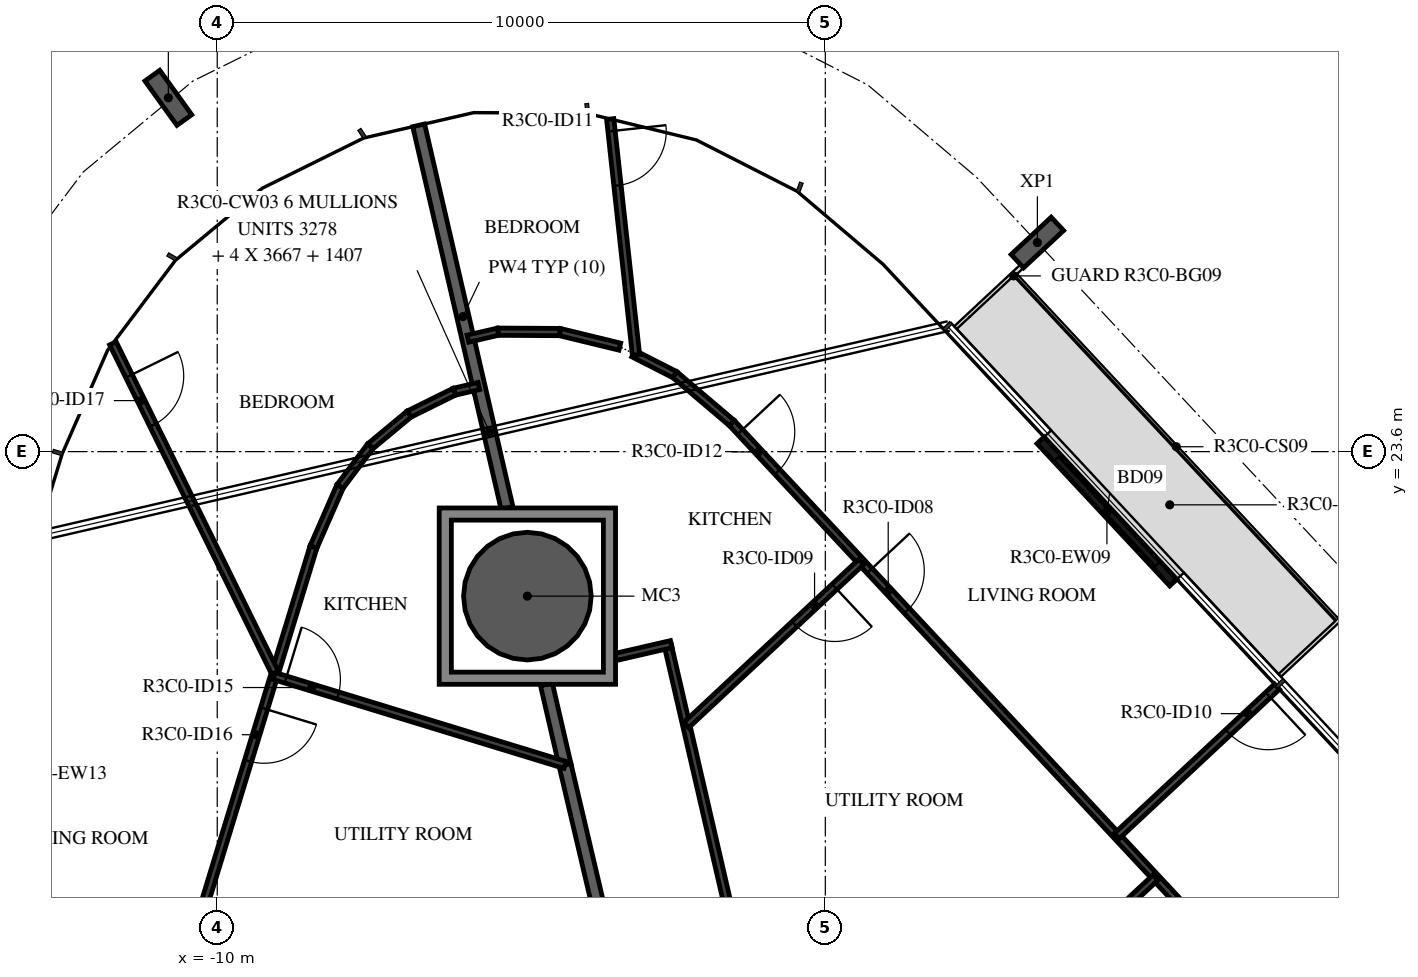
"""IFC4 building model, lengths in metres.
Left out: names, types, materials, properties, quantities, classifications, styles, units other than length and angle.
Written with IfcOpenShell. Run it as: python <this file> out.ifc"""

import sys

from ifc_helpers import new_model, si_unit, direction, frame, frame_2d, origin, origin_2d, place, context, subcontext, project, spatial, polyline, rectangle, hollow_circle, i_section, outline, extrude, element, fill, save


model = new_model("IFC4")
c1 = context("Model", 3, precision=1e-05, world=origin(), true_north=direction((0.0, 1.0)))
c2 = subcontext(c1, "Body", "Model", "MODEL_VIEW")
j1 = project(units=[si_unit("LENGTHUNIT", "METRE"), si_unit("PLANEANGLEUNIT", "RADIAN")], contexts=[c1])
p1 = place(None, origin())
s1 = spatial("IfcSite", under=j1, at=p1, CompositionType="ELEMENT")
p2 = place(p1, origin())
s2 = spatial("IfcBuilding", under=s1, at=p2, CompositionType="ELEMENT")
p3 = place(p2, frame((0.0, 0.0, 134.4)))
s3 = spatial("IfcBuildingStorey", under=s2, at=p3, CompositionType="ELEMENT", Elevation=134.4)
p4 = place(p3, frame((-4.9, 21.223, -0.38), z_axis=(0.0, 0.0, 1.0), x_axis=(1.0, 0.0, 0.0)))
e1 = element("IfcColumn", 1, at=p4, inside=s3, PredefinedType="COLUMN", context=c2, shape_type="SweptSolid", body=[
    extrude(hollow_circle(Radius=1.05, WallThickness=0.05, at=origin_2d()), origin(), (0.0, 0.0, 1.0), 3.5),
])
for number, where, z_axis, x_axis in (
    (2, (3.487, 27.039, -0.38), (0.0, 0.0, 1.0), (0.682, -0.731, 0.0)),
    (3, (-10.804, 29.418, -0.38), (0.0, 0.0, 1.0), (0.811, 0.585, 0.0)),
):
    element("IfcColumn", number, at=place(p3, frame(where, z_axis=z_axis, x_axis=x_axis)), inside=s3, PredefinedType="COLUMN", context=c2, shape_type="SweptSolid", body=[
        extrude(i_section(OverallWidth=0.3, OverallDepth=0.9, WebThickness=0.019, FlangeThickness=0.035, FilletRadius=0.03, at=origin_2d()), origin(), (0.0, 0.0, 1.0), 3.5),
    ])
p5 = place(p3, frame((5.722, 21.446, 0.0), z_axis=(0.0, 0.0, 1.0), x_axis=(-0.681994703002, 0.731357111866, 0.0)))
e4 = element("IfcWall", 4, at=p5, inside=s3, PredefinedType="STANDARD", context=c2, shape_type="SweptSolid", body=[
    extrude(rectangle(XDim=3.2, YDim=0.16, at=frame_2d((1.6, 0.0))), origin(), (0.0, 0.0, 1.0), 3.12),
])
p6 = place(p5, frame((0.4, 0.0, 0.0)))
e5 = element("IfcOpeningElement", 5, at=p6, cuts=e4, PredefinedType="OPENING", context=c2, shape_type="SweptSolid", body=[
    extrude(rectangle(XDim=2.4, YDim=2.4, at=frame_2d((1.2, 1.2))), frame((0.0, 0.09, 0.0), z_axis=(0.0, -1.0, 0.0), x_axis=(1.0, 0.0, 0.0)), (0.0, 0.0, 1.0), 0.18),
])
p7 = place(p3, frame((-4.281, 18.448, 0.0), z_axis=(0.0, 0.0, 1.0), x_axis=(0.228867856942, -0.973457499873, 0.0)))
e6 = element("IfcWall", 6, at=p7, inside=s3, PredefinedType="STANDARD", context=c2, shape_type="SweptSolid", body=[
    extrude(rectangle(XDim=5.238, YDim=0.2, at=frame_2d((2.619, 0.0))), origin(), (0.0, 0.0, 1.0), 3.12),
])
p8 = place(p3, frame((-4.586, 19.771, 0.0), z_axis=(0.0, 0.0, 1.0), x_axis=(0.224898895484, -0.974382105136, 0.0)))
e7 = element("IfcWall", 7, at=p8, inside=s3, PredefinedType="STANDARD", context=c2, shape_type="SweptSolid", body=[
    extrude(rectangle(XDim=1.358, YDim=0.2, at=frame_2d((0.679, 0.0))), origin(), (0.0, 0.0, 1.0), 3.12),
])
p9 = place(p3, frame((-6.687, 28.966, 0.0), z_axis=(0.0, 0.0, 1.0), x_axis=(0.224945100086, -0.974371439415, 0.0)))
e8 = element("IfcWall", 8, at=p9, inside=s3, PredefinedType="STANDARD", context=c2, shape_type="SweptSolid", body=[
    extrude(rectangle(XDim=6.458, YDim=0.2, at=frame_2d((3.229, 0.0))), origin(), (0.0, 0.0, 1.0), 3.12),
])
p10 = place(p3, frame((-1.404, 15.276, 0.0), z_axis=(0.0, 0.0, 1.0), x_axis=(-0.224947305813, 0.974370930194, 0.0)))
e9 = element("IfcWall", 9, at=p10, inside=s3, PredefinedType="PARTITIONING", context=c2, shape_type="SweptSolid", body=[
    extrude(rectangle(XDim=5.28, YDim=0.12, at=frame_2d((2.64, 0.0))), origin(), (0.0, 0.0, 1.0), 3.12),
])
p11 = place(p3, frame((-2.533, 20.434, 0.0), z_axis=(0.0, 0.0, 1.0), x_axis=(-0.974387124574, -0.224877147491, 0.0)))
e10 = element("IfcWall", 10, at=p11, inside=s3, PredefinedType="PARTITIONING", context=c2, shape_type="SweptSolid", body=[
    extrude(rectangle(XDim=1.011, YDim=0.12, at=frame_2d((0.505, 0.0))), origin(), (0.0, 0.0, 1.0), 3.12),
])
p12 = place(p3, frame((-1.539, 24.071, 0.0), z_axis=(0.0, 0.0, 1.0), x_axis=(0.68200220595, -0.731350115252, 0.0)))
e11 = element("IfcWall", 11, at=p12, inside=s3, PredefinedType="PARTITIONING", context=c2, shape_type="SweptSolid", body=[
    extrude(rectangle(XDim=17.316, YDim=0.12, at=frame_2d((8.658, 0.0))), origin(), (0.0, 0.0, 1.0), 3.12),
])
p13 = place(p12, frame((3.323, 0.0, 0.0)))
e12 = element("IfcOpeningElement", 12, at=p13, cuts=e11, PredefinedType="OPENING", context=c2, shape_type="SweptSolid", body=[
    extrude(rectangle(XDim=0.9, YDim=2.1, at=frame_2d((0.45, 1.05))), frame((0.0, 0.07, 0.0), z_axis=(0.0, -1.0, 0.0), x_axis=(1.0, 0.0, 0.0)), (0.0, 0.0, 1.0), 0.14),
])
p14 = place(p12, frame((0.2, 0.0, 0.0)))
e13 = element("IfcOpeningElement", 13, at=p14, cuts=e11, PredefinedType="OPENING", context=c2, shape_type="SweptSolid", body=[
    extrude(rectangle(XDim=0.9, YDim=2.1, at=frame_2d((0.45, 1.05))), frame((0.0, 0.07, 0.0), z_axis=(0.0, -1.0, 0.0), x_axis=(1.0, 0.0, 0.0)), (0.0, 0.0, 1.0), 0.14),
])
p15 = place(p3, frame((7.427, 19.734, 0.0), z_axis=(0.0, 0.0, 1.0), x_axis=(-0.73139345201, -0.681955730497, 0.0)))
e14 = element("IfcWall", 14, at=p15, inside=s3, PredefinedType="PARTITIONING", context=c2, shape_type="SweptSolid", body=[
    extrude(rectangle(XDim=3.6, YDim=0.12, at=frame_2d((1.8, 0.0))), origin(), (0.0, 0.0, 1.0), 2.73),
])
p16 = place(p15, frame((0.2, 0.0, 0.0)))
e15 = element("IfcOpeningElement", 15, at=p16, cuts=e14, PredefinedType="OPENING", context=c2, shape_type="SweptSolid", body=[
    extrude(rectangle(XDim=0.9, YDim=2.1, at=frame_2d((0.45, 1.05))), frame((0.0, 0.07, 0.0), z_axis=(0.0, -1.0, 0.0), x_axis=(1.0, 0.0, 0.0)), (0.0, 0.0, 1.0), 0.14),
])
p17 = place(p3, frame((5.431, 16.597, 0.0), z_axis=(0.0, 0.0, 1.0), x_axis=(-0.731378807316, -0.681971436505, 0.0)))
e16 = element("IfcWall", 16, at=p17, inside=s3, PredefinedType="PARTITIONING", context=c2, shape_type="SweptSolid", body=[
    extrude(rectangle(XDim=2.609, YDim=0.12, at=frame_2d((1.305, 0.0))), origin(), (0.0, 0.0, 1.0), 3.12),
])
p18 = place(p3, frame((-3.156, 25.212, 0.0), z_axis=(0.0, 0.0, 1.0), x_axis=(0.890954246936, -0.454093085025, 0.0)))
e17 = element("IfcWall", 17, at=p18, inside=s3, PredefinedType="PARTITIONING", context=c2, shape_type="SweptSolid", body=[
    extrude(rectangle(XDim=0.765, YDim=0.12, at=frame_2d((0.383, 0.0))), origin(), (0.0, 0.0, 1.0), 3.12),
])
p19 = place(p3, frame((-2.474, 24.865, 0.0), z_axis=(0.0, 0.0, 1.0), x_axis=(0.762351487461, -0.647163201647, 0.0)))
e18 = element("IfcWall", 18, at=p19, inside=s3, PredefinedType="PARTITIONING", context=c2, shape_type="SweptSolid", body=[
    extrude(rectangle(XDim=1.227, YDim=0.12, at=frame_2d((0.614, 0.0))), origin(), (0.0, 0.0, 1.0), 3.12),
])
p20 = place(p3, frame((-3.538, 29.07, 0.0), z_axis=(0.0, 0.0, 1.0), x_axis=(0.1087420482, -0.994070001033, 0.0)))
e19 = element("IfcWall", 19, at=p20, inside=s3, PredefinedType="PARTITIONING", context=c2, shape_type="SweptSolid", body=[
    extrude(rectangle(XDim=3.902, YDim=0.12, at=frame_2d((1.951, 0.0))), origin(), (0.0, 0.0, 1.0), 3.12),
])
p21 = place(p20, frame((0.2, 0.0, 0.0)))
e20 = element("IfcOpeningElement", 20, at=p21, cuts=e19, PredefinedType="OPENING", context=c2, shape_type="SweptSolid", body=[
    extrude(rectangle(XDim=0.9, YDim=2.1, at=frame_2d((0.45, 1.05))), frame((0.0, 0.07, 0.0), z_axis=(0.0, -1.0, 0.0), x_axis=(1.0, 0.0, 0.0)), (0.0, 0.0, 1.0), 0.14),
])
p22 = place(p3, frame((0.591, 21.787, 0.0), z_axis=(0.0, 0.0, 1.0), x_axis=(-0.731364619453, -0.681986651931, 0.0)))
e21 = element("IfcWall", 21, at=p22, inside=s3, PredefinedType="PARTITIONING", context=c2, shape_type="SweptSolid", body=[
    extrude(rectangle(XDim=3.936, YDim=0.12, at=frame_2d((1.968, 0.0))), origin(), (0.0, 0.0, 1.0), 3.12),
])
p23 = place(p22, frame((0.6, 0.0, 0.0)))
e22 = element("IfcOpeningElement", 22, at=p23, cuts=e21, PredefinedType="OPENING", context=c2, shape_type="SweptSolid", body=[
    extrude(rectangle(XDim=0.9, YDim=2.1, at=frame_2d((0.45, 1.05))), frame((0.0, 0.07, 0.0), z_axis=(0.0, -1.0, 0.0), x_axis=(1.0, 0.0, 0.0)), (0.0, 0.0, 1.0), 0.14),
])
p24 = place(p3, frame((-3.379, 25.326, 0.0), z_axis=(0.0, 0.0, 1.0), x_axis=(-0.971704876381, 0.236198292157, 0.0)))
e23 = element("IfcWall", 23, at=p24, inside=s3, PredefinedType="PARTITIONING", context=c2, shape_type="SweptSolid", body=[
    extrude(rectangle(XDim=1.016, YDim=0.12, at=frame_2d((0.508, 0.0))), origin(), (0.0, 0.0, 1.0), 3.12),
])
p25 = place(p3, frame((-4.367, 25.566, 0.0), z_axis=(0.0, 0.0, 1.0), x_axis=(-0.999983366401, 0.005767748328, 0.0)))
e24 = element("IfcWall", 24, at=p25, inside=s3, PredefinedType="PARTITIONING", context=c2, shape_type="SweptSolid", body=[
    extrude(rectangle(XDim=1.016, YDim=0.12, at=frame_2d((0.508, 0.0))), origin(), (0.0, 0.0, 1.0), 3.12),
])
p26 = place(p3, frame((-5.383, 25.572, 0.0), z_axis=(0.0, 0.0, 1.0), x_axis=(-0.974366885246, -0.224964825997, 0.0)))
e25 = element("IfcWall", 25, at=p26, inside=s3, PredefinedType="PARTITIONING", context=c2, shape_type="SweptSolid", body=[
    extrude(rectangle(XDim=0.508, YDim=0.12, at=frame_2d((0.254, 0.0))), origin(), (0.0, 0.0, 1.0), 3.12),
])
p27 = place(p3, frame((-5.698, 24.679, 0.0), z_axis=(0.0, 0.0, 1.0), x_axis=(-0.974222160042, -0.225590742017, 0.0)))
e26 = element("IfcWall", 26, at=p27, inside=s3, PredefinedType="PARTITIONING", context=c2, shape_type="SweptSolid", body=[
    extrude(rectangle(XDim=0.415, YDim=0.12, at=frame_2d((0.207, 0.0))), origin(), (0.0, 0.0, 1.0), 3.12),
])
p28 = place(p3, frame((-6.101, 24.585, 0.0), z_axis=(0.0, 0.0, 1.0), x_axis=(-0.896362871824, -0.443321104862, 0.0)))
e27 = element("IfcWall", 27, at=p28, inside=s3, PredefinedType="PARTITIONING", context=c2, shape_type="SweptSolid", body=[
    extrude(rectangle(XDim=0.829, YDim=0.12, at=frame_2d((0.415, 0.0))), origin(), (0.0, 0.0, 1.0), 3.12),
])
p29 = place(p3, frame((-6.844, 24.218, 0.0), z_axis=(0.0, 0.0, 1.0), x_axis=(-0.769715611418, -0.63838693403, 0.0)))
e28 = element("IfcWall", 28, at=p29, inside=s3, PredefinedType="PARTITIONING", context=c2, shape_type="SweptSolid", body=[
    extrude(rectangle(XDim=0.829, YDim=0.12, at=frame_2d((0.415, 0.0))), origin(), (0.0, 0.0, 1.0), 3.12),
])
p30 = place(p3, frame((-7.482, 23.688, 0.0), z_axis=(0.0, 0.0, 1.0), x_axis=(-0.601836624867, -0.798619231529, 0.0)))
e29 = element("IfcWall", 29, at=p30, inside=s3, PredefinedType="PARTITIONING", context=c2, shape_type="SweptSolid", body=[
    extrude(rectangle(XDim=0.829, YDim=0.12, at=frame_2d((0.415, 0.0))), origin(), (0.0, 0.0, 1.0), 3.12),
])
p31 = place(p3, frame((-7.981, 23.027, 0.0), z_axis=(0.0, 0.0, 1.0), x_axis=(-0.401360750198, -0.915920055573, 0.0)))
e30 = element("IfcWall", 30, at=p31, inside=s3, PredefinedType="PARTITIONING", context=c2, shape_type="SweptSolid", body=[
    extrude(rectangle(XDim=1.087, YDim=0.12, at=frame_2d((0.543, 0.0))), origin(), (0.0, 0.0, 1.0), 3.12),
])
p32 = place(p3, frame((-8.417, 22.031, 0.0), z_axis=(0.0, 0.0, 1.0), x_axis=(-0.292371891841, -0.956304698755, 0.0)))
e31 = element("IfcWall", 31, at=p32, inside=s3, PredefinedType="PARTITIONING", context=c2, shape_type="SweptSolid", body=[
    extrude(rectangle(XDim=13.306, YDim=0.12, at=frame_2d((6.653, 0.0))), origin(), (0.0, 0.0, 1.0), 3.12),
])
p33 = place(p32, frame((2.777, 0.0, 0.0)))
e32 = element("IfcOpeningElement", 32, at=p33, cuts=e31, PredefinedType="OPENING", context=c2, shape_type="SweptSolid", body=[
    extrude(rectangle(XDim=0.9, YDim=2.1, at=frame_2d((0.45, 1.05))), frame((0.0, 0.07, 0.0), z_axis=(0.0, -1.0, 0.0), x_axis=(1.0, 0.0, 0.0)), (0.0, 0.0, 1.0), 0.14),
])
p34 = place(p3, frame((-9.066, 19.91, 0.0), z_axis=(0.0, 0.0, 1.0), x_axis=(0.956313309797, -0.292343724928, 0.0)))
e33 = element("IfcWall", 33, at=p34, inside=s3, PredefinedType="PARTITIONING", context=c2, shape_type="SweptSolid", body=[
    extrude(rectangle(XDim=5.004, YDim=0.12, at=frame_2d((2.502, 0.0))), origin(), (0.0, 0.0, 1.0), 3.12),
])
p35 = place(p34, frame((0.2, 0.0, 0.0)))
e34 = element("IfcOpeningElement", 34, at=p35, cuts=e33, PredefinedType="OPENING", context=c2, shape_type="SweptSolid", body=[
    extrude(rectangle(XDim=0.9, YDim=2.1, at=frame_2d((0.45, 1.05))), frame((0.0, 0.07, 0.0), z_axis=(0.0, -1.0, 0.0), x_axis=(1.0, 0.0, 0.0)), (0.0, 0.0, 1.0), 0.14),
])
p36 = place(p3, frame((-11.716, 25.381, 0.0), z_axis=(0.0, 0.0, 1.0), x_axis=(0.441576881221, -0.897223415862, 0.0)))
e35 = element("IfcWall", 35, at=p36, inside=s3, PredefinedType="PARTITIONING", context=c2, shape_type="SweptSolid", body=[
    extrude(rectangle(XDim=6.039, YDim=0.12, at=frame_2d((3.019, 0.0))), origin(), (0.0, 0.0, 1.0), 3.12),
])
p37 = place(p36, frame((0.6, 0.0, 0.0)))
e36 = element("IfcOpeningElement", 36, at=p37, cuts=e35, PredefinedType="OPENING", context=c2, shape_type="SweptSolid", body=[
    extrude(rectangle(XDim=0.9, YDim=2.1, at=frame_2d((0.45, 1.05))), frame((0.0, 0.07, 0.0), z_axis=(0.0, -1.0, 0.0), x_axis=(1.0, 0.0, 0.0)), (0.0, 0.0, 1.0), 0.14),
])
p38 = place(p3, origin())
e37 = element("IfcWall", 37, at=p38, inside=s3, PredefinedType="STANDARD", context=c2, shape_type="SweptSolid", body=[
    extrude(outline(polyline([(-3.45, 22.674), (-3.45, 19.773), (-6.35, 19.773), (-6.35, 22.674), (-3.45, 22.674)]), holes=[polyline([(-6.15, 19.973), (-3.65, 19.973), (-3.65, 22.473), (-6.15, 22.473), (-6.15, 19.973)])]), origin(), (0.0, 0.0, 1.0), 3.12),
])
p39 = place(p6, origin())
e38 = element("IfcDoor", 38, at=p39, inside=s3, OperationType="DOUBLE_DOOR_SLIDING", PredefinedType="DOOR", context=c2, shape_type="SweptSolid", body=[
    extrude(rectangle(XDim=2.4, YDim=2.4, at=frame_2d((1.2, 1.2))), frame((0.0, 0.025, 0.0), z_axis=(0.0, -1.0, 0.0), x_axis=(1.0, 0.0, 0.0)), (0.0, 0.0, 1.0), 0.05),
])
fill(e5, e38)
p40 = place(p13, origin())
e39 = element("IfcDoor", 39, at=p40, inside=s3, OperationType="SINGLE_SWING_RIGHT", PredefinedType="DOOR", context=c2, shape_type="SweptSolid", body=[
    extrude(rectangle(XDim=0.9, YDim=2.1, at=frame_2d((0.45, 1.05))), frame((0.0, 0.025, 0.0), z_axis=(0.0, -1.0, 0.0), x_axis=(1.0, 0.0, 0.0)), (0.0, 0.0, 1.0), 0.05),
])
fill(e12, e39)
p41 = place(p23, origin())
e40 = element("IfcDoor", 40, at=p41, inside=s3, OperationType="SINGLE_SWING_RIGHT", PredefinedType="DOOR", context=c2, shape_type="SweptSolid", body=[
    extrude(rectangle(XDim=0.9, YDim=2.1, at=frame_2d((0.45, 1.05))), frame((0.0, 0.025, 0.0), z_axis=(0.0, -1.0, 0.0), x_axis=(1.0, 0.0, 0.0)), (0.0, 0.0, 1.0), 0.05),
])
fill(e22, e40)
p42 = place(p16, origin())
e41 = element("IfcDoor", 41, at=p42, inside=s3, OperationType="SINGLE_SWING_LEFT", PredefinedType="DOOR", context=c2, shape_type="SweptSolid", body=[
    extrude(rectangle(XDim=0.9, YDim=2.1, at=frame_2d((0.45, 1.05))), frame((0.0, 0.025, 0.0), z_axis=(0.0, -1.0, 0.0), x_axis=(1.0, 0.0, 0.0)), (0.0, 0.0, 1.0), 0.05),
])
fill(e15, e41)
p43 = place(p21, origin())
e42 = element("IfcDoor", 42, at=p43, inside=s3, OperationType="SINGLE_SWING_RIGHT", PredefinedType="DOOR", context=c2, shape_type="SweptSolid", body=[
    extrude(rectangle(XDim=0.9, YDim=2.1, at=frame_2d((0.45, 1.05))), frame((0.0, 0.025, 0.0), z_axis=(0.0, -1.0, 0.0), x_axis=(1.0, 0.0, 0.0)), (0.0, 0.0, 1.0), 0.05),
])
fill(e20, e42)
p44 = place(p14, origin())
e43 = element("IfcDoor", 43, at=p44, inside=s3, OperationType="SINGLE_SWING_LEFT", PredefinedType="DOOR", context=c2, shape_type="SweptSolid", body=[
    extrude(rectangle(XDim=0.9, YDim=2.1, at=frame_2d((0.45, 1.05))), frame((0.0, 0.025, 0.0), z_axis=(0.0, -1.0, 0.0), x_axis=(1.0, 0.0, 0.0)), (0.0, 0.0, 1.0), 0.05),
])
fill(e13, e43)
p45 = place(p35, origin())
e44 = element("IfcDoor", 44, at=p45, inside=s3, OperationType="SINGLE_SWING_LEFT", PredefinedType="DOOR", context=c2, shape_type="SweptSolid", body=[
    extrude(rectangle(XDim=0.9, YDim=2.1, at=frame_2d((0.45, 1.05))), frame((0.0, 0.025, 0.0), z_axis=(0.0, -1.0, 0.0), x_axis=(1.0, 0.0, 0.0)), (0.0, 0.0, 1.0), 0.05),
])
fill(e34, e44)
p46 = place(p33, origin())
e45 = element("IfcDoor", 45, at=p46, inside=s3, OperationType="SINGLE_SWING_LEFT", PredefinedType="DOOR", context=c2, shape_type="SweptSolid", body=[
    extrude(rectangle(XDim=0.9, YDim=2.1, at=frame_2d((0.45, 1.05))), frame((0.0, 0.025, 0.0), z_axis=(0.0, -1.0, 0.0), x_axis=(1.0, 0.0, 0.0)), (0.0, 0.0, 1.0), 0.05),
])
fill(e32, e45)
p47 = place(p37, origin())
e46 = element("IfcDoor", 46, at=p47, inside=s3, OperationType="SINGLE_SWING_LEFT", PredefinedType="DOOR", context=c2, shape_type="SweptSolid", body=[
    extrude(rectangle(XDim=0.9, YDim=2.1, at=frame_2d((0.45, 1.05))), frame((0.0, 0.025, 0.0), z_axis=(0.0, -1.0, 0.0), x_axis=(1.0, 0.0, 0.0)), (0.0, 0.0, 1.0), 0.05),
])
fill(e36, e46)
save(model, sys.argv[1])
